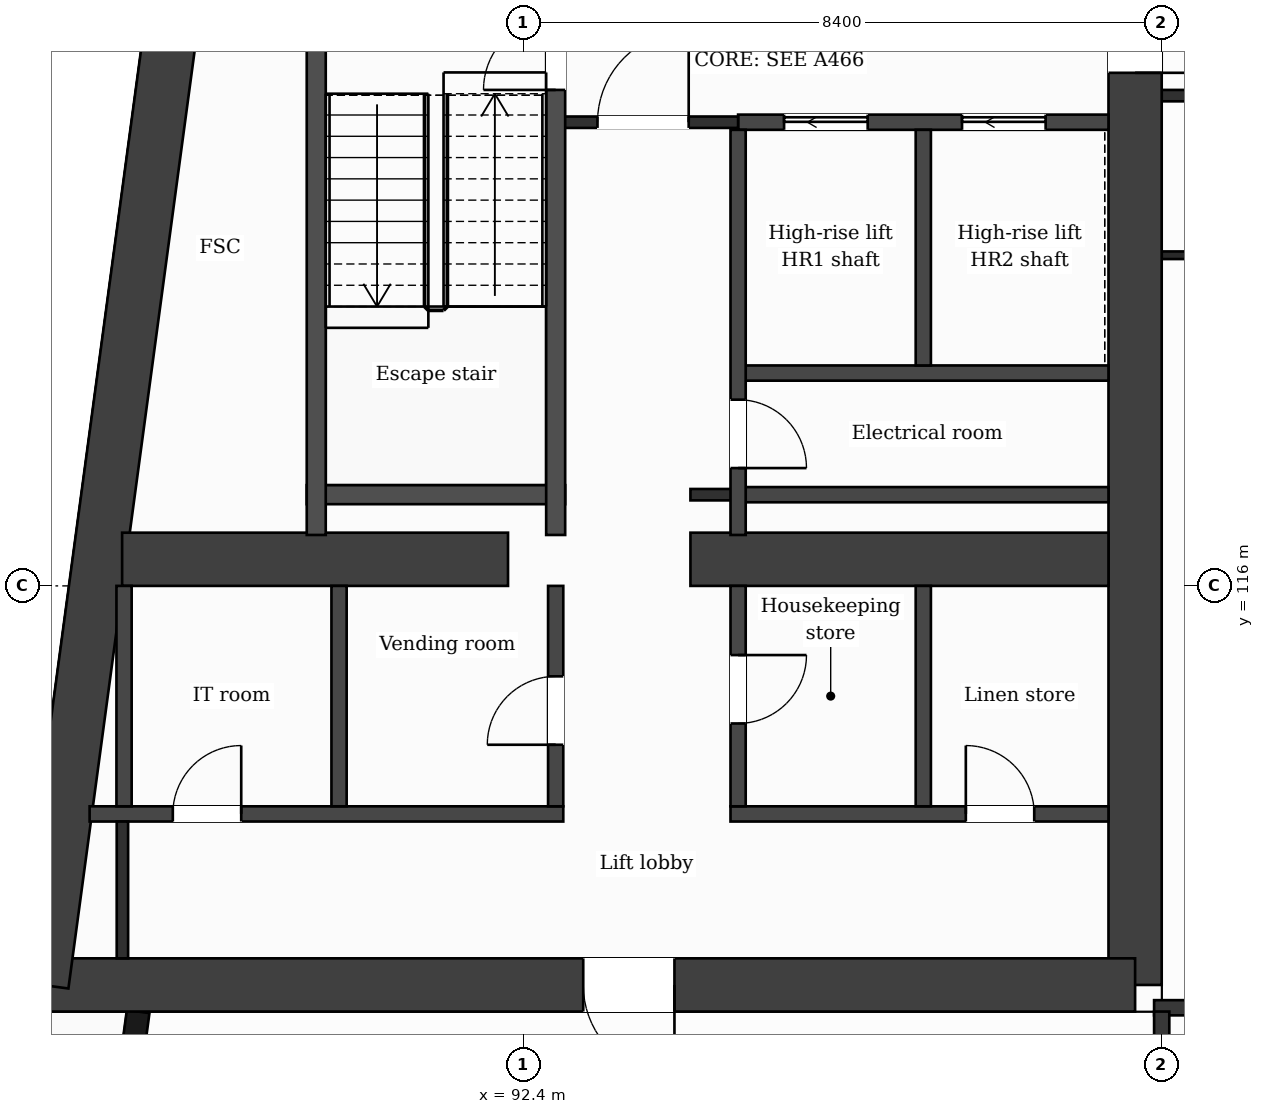
"""IFC4 building model, lengths in metres.
Left out: names, types, materials, properties, quantities, classifications, styles, units other than length and angle.
Written with IfcOpenShell. Run it as: python <this file> out.ifc"""

import sys

from ifc_helpers import new_model, si_unit, direction, frame, frame_2d, origin, place, context, subcontext, project, spatial, rectangle, extrude, element, fill, save


model = new_model("IFC4")
c1 = context("Model", 3, precision=1e-05, world=origin(), true_north=direction((0.0, 1.0)))
c2 = subcontext(c1, "Body", "Model", "MODEL_VIEW")
j1 = project(units=[si_unit("LENGTHUNIT", "METRE"), si_unit("PLANEANGLEUNIT", "RADIAN")], contexts=[c1])
p1 = place(None, origin())
s1 = spatial("IfcSite", under=j1, at=p1, CompositionType="ELEMENT")
p2 = place(p1, origin())
s2 = spatial("IfcBuilding", under=s1, at=p2, CompositionType="ELEMENT")
p3 = place(p2, frame((0.0, 0.0, 270.1)))
s3 = spatial("IfcBuildingStorey", under=s2, at=p3, CompositionType="ELEMENT", Elevation=270.1)
p4 = place(p3, frame((100.45, 132.05, 0.0), z_axis=(0.0, 0.0, 1.0), x_axis=(0.0, -1.0, 0.0)))
e1 = element("IfcWall", 1, at=p4, inside=s3, PredefinedType="SHEAR", context=c2, shape_type="SweptSolid", body=[
    extrude(rectangle(XDim=21.3, YDim=0.7, at=frame_2d((10.65, 0.0))), origin(), (0.0, 0.0, 1.0), 3.7),
])
p5 = place(p4, frame((7.9, 0.0, 0.0)))
e2 = element("IfcOpeningElement", 2, at=p5, cuts=e1, PredefinedType="OPENING", context=c2, shape_type="SweptSolid", body=[
    extrude(rectangle(XDim=1.4, YDim=2.1, at=frame_2d((0.7, 1.05))), frame((0.0, 0.36, 0.0), z_axis=(0.0, -1.0, 0.0), x_axis=(1.0, 0.0, 0.0)), (0.0, 0.0, 1.0), 0.72),
])
p6 = place(p3, frame((100.45, 110.75, 0.0), z_axis=(0.0, 0.0, 1.0), x_axis=(-1.0, 0.0, 0.0)))
e3 = element("IfcWall", 3, at=p6, inside=s3, PredefinedType="SHEAR", context=c2, shape_type="SweptSolid", body=[
    extrude(rectangle(XDim=14.38, YDim=0.7, at=frame_2d((7.19, 0.0))), origin(), (0.0, 0.0, 1.0), 3.7),
])
p7 = place(p6, frame((6.06, 0.0, 0.0)))
e4 = element("IfcOpeningElement", 4, at=p7, cuts=e3, PredefinedType="OPENING", context=c2, shape_type="SweptSolid", body=[
    extrude(rectangle(XDim=1.2, YDim=2.1, at=frame_2d((0.6, 1.05))), frame((0.0, 0.36, 0.0), z_axis=(0.0, -1.0, 0.0), x_axis=(1.0, 0.0, 0.0)), (0.0, 0.0, 1.0), 0.72),
])
p8 = place(p3, frame((86.07, 110.75, 0.0), z_axis=(0.0, 0.0, 1.0), x_axis=(0.133406218907, 0.991061441464, 0.0)))
e5 = element("IfcWall", 5, at=p8, inside=s3, PredefinedType="SHEAR", context=c2, shape_type="SweptSolid", body=[
    extrude(rectangle(XDim=21.492, YDim=0.7, at=frame_2d((10.746, 0.0))), origin(), (0.0, 0.0, 1.0), 3.7),
])
p9 = place(p3, frame((87.123, 116.35, 0.0), z_axis=(0.0, 0.0, 1.0), x_axis=(1.0, 0.0, 0.0)))
e6 = element("IfcWall", 6, at=p9, inside=s3, PredefinedType="SHEAR", context=c2, shape_type="SweptSolid", body=[
    extrude(rectangle(XDim=5.077, YDim=0.7, at=frame_2d((2.539, 0.0))), origin(), (0.0, 0.0, 1.0), 3.7),
])
p10 = place(p3, frame((94.6, 116.35, 0.0), z_axis=(0.0, 0.0, 1.0), x_axis=(1.0, 0.0, 0.0)))
e7 = element("IfcWall", 7, at=p10, inside=s3, PredefinedType="SHEAR", context=c2, shape_type="SweptSolid", body=[
    extrude(rectangle(XDim=5.5, YDim=0.7, at=frame_2d((2.75, 0.0))), origin(), (0.0, 0.0, 1.0), 3.7),
])
p11 = place(p3, frame((87.334, 110.4, 0.0), z_axis=(0.0, 0.0, 1.0), x_axis=(-0.13345962011, -0.991054251694, 0.0)))
e8 = element("IfcWall", 8, at=p11, inside=s3, PredefinedType="SOLIDWALL", context=c2, shape_type="SweptSolid", body=[
    extrude(rectangle(XDim=1.937, YDim=0.3, at=frame_2d((0.969, 0.0))), origin(), (0.0, 0.0, 1.0), 3.38),
])
p12 = place(p3, frame((100.7, 110.45, 0.0), z_axis=(0.0, 0.0, 1.0), x_axis=(1.0, 0.0, 0.0)))
e9 = element("IfcWall", 9, at=p12, inside=s3, PredefinedType="PARTITIONING", context=c2, shape_type="SweptSolid", body=[
    extrude(rectangle(XDim=25.4, YDim=0.2, at=frame_2d((12.7, 0.0))), origin(), (0.0, 0.0, 1.0), 3.38),
])
p13 = place(p3, frame((86.696, 113.0, 0.0), z_axis=(0.0, 0.0, 1.0), x_axis=(1.0, 0.0, 0.0)))
e10 = element("IfcWall", 10, at=p13, inside=s3, PredefinedType="PARTITIONING", context=c2, shape_type="SweptSolid", body=[
    extrude(rectangle(XDim=6.231, YDim=0.2, at=frame_2d((3.116, 0.0))), origin(), (0.0, 0.0, 1.0), 3.38),
])
p14 = place(p13, frame((1.094, 0.0, 0.0)))
e11 = element("IfcOpeningElement", 11, at=p14, cuts=e10, PredefinedType="OPENING", context=c2, shape_type="SweptSolid", body=[
    extrude(rectangle(XDim=0.9, YDim=2.1, at=frame_2d((0.45, 1.05))), frame((0.0, 0.11, 0.0), z_axis=(0.0, -1.0, 0.0), x_axis=(1.0, 0.0, 0.0)), (0.0, 0.0, 1.0), 0.22),
])
p15 = place(p3, frame((95.127, 113.0, 0.0), z_axis=(0.0, 0.0, 1.0), x_axis=(1.0, 0.0, 0.0)))
e12 = element("IfcWall", 12, at=p15, inside=s3, PredefinedType="PARTITIONING", context=c2, shape_type="SweptSolid", body=[
    extrude(rectangle(XDim=4.973, YDim=0.2, at=frame_2d((2.487, 0.0))), origin(), (0.0, 0.0, 1.0), 3.38),
])
p16 = place(p15, frame((3.096, 0.0, 0.0)))
e13 = element("IfcOpeningElement", 13, at=p16, cuts=e12, PredefinedType="OPENING", context=c2, shape_type="SweptSolid", body=[
    extrude(rectangle(XDim=0.9, YDim=2.1, at=frame_2d((0.45, 1.05))), frame((0.0, 0.11, 0.0), z_axis=(0.0, -1.0, 0.0), x_axis=(1.0, 0.0, 0.0)), (0.0, 0.0, 1.0), 0.22),
])
p17 = place(p3, frame((95.227, 117.2, 0.0), z_axis=(0.0, 0.0, 1.0), x_axis=(1.0, 0.0, 0.0)))
e14 = element("IfcWall", 14, at=p17, inside=s3, PredefinedType="PARTITIONING", context=c2, shape_type="SweptSolid", body=[
    extrude(rectangle(XDim=4.873, YDim=0.2, at=frame_2d((2.437, 0.0))), origin(), (0.0, 0.0, 1.0), 3.38),
])
p18 = place(p3, frame((94.6, 117.2, 0.0), z_axis=(0.0, 0.0, 1.0), x_axis=(1.0, 0.0, 0.0)))
e15 = element("IfcWall", 15, at=p18, inside=s3, PredefinedType="PARTITIONING", context=c2, shape_type="SweptSolid", body=[
    extrude(rectangle(XDim=0.627, YDim=0.15, at=frame_2d((0.313, 0.0))), origin(), (0.0, 0.0, 1.0), 3.38),
])
p19 = place(p3, frame((89.552, 117.2, 0.0), z_axis=(0.0, 0.0, 1.0), x_axis=(1.0, 0.0, 0.0)))
e16 = element("IfcWall", 16, at=p19, inside=s3, PredefinedType="PARTITIONING", context=c2, shape_type="SweptSolid", body=[
    extrude(rectangle(XDim=3.4, YDim=0.25, at=frame_2d((1.7, 0.0))), origin(), (0.0, 0.0, 1.0), 3.38),
])
p20 = place(p3, frame((95.227, 118.8, 0.0), z_axis=(0.0, 0.0, 1.0), x_axis=(1.0, 0.0, 0.0)))
e17 = element("IfcWall", 17, at=p20, inside=s3, PredefinedType="PARTITIONING", context=c2, shape_type="SweptSolid", body=[
    extrude(rectangle(XDim=4.873, YDim=0.2, at=frame_2d((2.437, 0.0))), origin(), (0.0, 0.0, 1.0), 3.38),
])
p21 = place(p3, frame((100.8, 120.35, 0.0), z_axis=(0.0, 0.0, 1.0), x_axis=(1.0, 0.0, 0.0)))
e18 = element("IfcWall", 18, at=p21, inside=s3, PredefinedType="PARTITIONING", context=c2, shape_type="SweptSolid", body=[
    extrude(rectangle(XDim=2.75, YDim=0.1, at=frame_2d((1.375, 0.0))), origin(), (0.0, 0.0, 1.0), 3.38),
])
p22 = place(p21, frame((1.07, 0.0, 0.0)))
e19 = element("IfcOpeningElement", 19, at=p22, cuts=e18, PredefinedType="OPENING", context=c2, shape_type="SweptSolid", body=[
    extrude(rectangle(XDim=0.8, YDim=2.1, at=frame_2d((0.4, 1.05))), frame((0.0, 0.06, 0.0), z_axis=(0.0, -1.0, 0.0), x_axis=(1.0, 0.0, 0.0)), (0.0, 0.0, 1.0), 0.12),
])
p23 = place(p3, frame((95.227, 122.1, 0.0), z_axis=(0.0, 0.0, 1.0), x_axis=(1.0, 0.0, 0.0)))
e20 = element("IfcWall", 20, at=p23, inside=s3, PredefinedType="PARTITIONING", context=c2, shape_type="SweptSolid", body=[
    extrude(rectangle(XDim=4.873, YDim=0.2, at=frame_2d((2.437, 0.0))), origin(), (0.0, 0.0, 1.0), 3.38),
])
p24 = place(p23, frame((0.605, 0.0, 0.0)))
e21 = element("IfcOpeningElement", 21, at=p24, cuts=e20, PredefinedType="OPENING", context=c2, shape_type="SweptSolid", body=[
    extrude(rectangle(XDim=1.1, YDim=2.1, at=frame_2d((0.55, 1.05))), frame((0.0, 0.11, 0.0), z_axis=(0.0, -1.0, 0.0), x_axis=(1.0, 0.0, 0.0)), (0.0, 0.0, 1.0), 0.22),
])
p25 = place(p23, frame((2.946, 0.0, 0.0)))
e22 = element("IfcOpeningElement", 22, at=p25, cuts=e20, PredefinedType="OPENING", context=c2, shape_type="SweptSolid", body=[
    extrude(rectangle(XDim=1.1, YDim=2.1, at=frame_2d((0.55, 1.05))), frame((0.0, 0.11, 0.0), z_axis=(0.0, -1.0, 0.0), x_axis=(1.0, 0.0, 0.0)), (0.0, 0.0, 1.0), 0.22),
])
p26 = place(p3, frame((92.827, 122.1, 0.0), z_axis=(0.0, 0.0, 1.0), x_axis=(1.0, 0.0, 0.0)))
e23 = element("IfcWall", 23, at=p26, inside=s3, PredefinedType="PARTITIONING", context=c2, shape_type="SweptSolid", body=[
    extrude(rectangle(XDim=2.4, YDim=0.15, at=frame_2d((1.2, 0.0))), origin(), (0.0, 0.0, 1.0), 3.38),
])
p27 = place(p26, frame((0.55, 0.0, 0.0)))
e24 = element("IfcOpeningElement", 24, at=p27, cuts=e23, PredefinedType="OPENING", context=c2, shape_type="SweptSolid", body=[
    extrude(rectangle(XDim=1.2, YDim=2.1, at=frame_2d((0.6, 1.05))), frame((0.0, 0.085, 0.0), z_axis=(0.0, -1.0, 0.0), x_axis=(1.0, 0.0, 0.0)), (0.0, 0.0, 1.0), 0.17),
])
p28 = place(p3, frame((100.8, 122.45, 0.0), z_axis=(0.0, 0.0, 1.0), x_axis=(1.0, 0.0, 0.0)))
e25 = element("IfcWall", 25, at=p28, inside=s3, PredefinedType="PARTITIONING", context=c2, shape_type="SweptSolid", body=[
    extrude(rectangle(XDim=25.2, YDim=0.15, at=frame_2d((12.6, 0.0))), origin(), (0.0, 0.0, 1.0), 3.38),
])
p29 = place(p28, frame((5.55, 0.0, 0.0)))
e26 = element("IfcOpeningElement", 26, at=p29, cuts=e25, PredefinedType="OPENING", context=c2, shape_type="SweptSolid", body=[
    extrude(rectangle(XDim=1.0, YDim=2.1, at=frame_2d((0.5, 1.05))), frame((0.0, 0.085, 0.0), z_axis=(0.0, -1.0, 0.0), x_axis=(1.0, 0.0, 0.0)), (0.0, 0.0, 1.0), 0.17),
])
p30 = place(p28, frame((8.862, 0.0, 0.0)))
e27 = element("IfcOpeningElement", 27, at=p30, cuts=e25, PredefinedType="OPENING", context=c2, shape_type="SweptSolid", body=[
    extrude(rectangle(XDim=0.95, YDim=2.1, at=frame_2d((0.475, 1.05))), frame((0.0, 0.085, 0.0), z_axis=(0.0, -1.0, 0.0), x_axis=(1.0, 0.0, 0.0)), (0.0, 0.0, 1.0), 0.17),
])
p31 = place(p28, frame((15.2, 0.0, 0.0)))
e28 = element("IfcOpeningElement", 28, at=p31, cuts=e25, PredefinedType="OPENING", context=c2, shape_type="SweptSolid", body=[
    extrude(rectangle(XDim=0.95, YDim=2.1, at=frame_2d((0.475, 1.05))), frame((0.0, 0.085, 0.0), z_axis=(0.0, -1.0, 0.0), x_axis=(1.0, 0.0, 0.0)), (0.0, 0.0, 1.0), 0.17),
])
p32 = place(p28, frame((17.325, 0.0, 0.0)))
e29 = element("IfcOpeningElement", 29, at=p32, cuts=e25, PredefinedType="OPENING", context=c2, shape_type="SweptSolid", body=[
    extrude(rectangle(XDim=1.0, YDim=2.1, at=frame_2d((0.5, 1.05))), frame((0.0, 0.085, 0.0), z_axis=(0.0, -1.0, 0.0), x_axis=(1.0, 0.0, 0.0)), (0.0, 0.0, 1.0), 0.17),
])
p33 = place(p28, frame((23.862, 0.0, 0.0)))
e30 = element("IfcOpeningElement", 30, at=p33, cuts=e25, PredefinedType="OPENING", context=c2, shape_type="SweptSolid", body=[
    extrude(rectangle(XDim=0.95, YDim=2.1, at=frame_2d((0.475, 1.05))), frame((0.0, 0.085, 0.0), z_axis=(0.0, -1.0, 0.0), x_axis=(1.0, 0.0, 0.0)), (0.0, 0.0, 1.0), 0.17),
])
p34 = place(p3, frame((87.148, 113.1, 0.0), z_axis=(0.0, 0.0, 1.0), x_axis=(0.0, 1.0, 0.0)))
e31 = element("IfcWall", 31, at=p34, inside=s3, PredefinedType="PARTITIONING", context=c2, shape_type="SweptSolid", body=[
    extrude(rectangle(XDim=2.9, YDim=0.2, at=frame_2d((1.45, 0.0))), origin(), (0.0, 0.0, 1.0), 3.38),
])
p35 = place(p3, frame((87.127, 111.1, 0.0), z_axis=(0.0, 0.0, 1.0), x_axis=(0.0, 1.0, 0.0)))
e32 = element("IfcWall", 32, at=p35, inside=s3, PredefinedType="PARTITIONING", context=c2, shape_type="SweptSolid", body=[
    extrude(rectangle(XDim=1.8, YDim=0.15, at=frame_2d((0.9, 0.0))), origin(), (0.0, 0.0, 1.0), 3.38),
])
p36 = place(p3, frame((89.677, 116.67, 0.0), z_axis=(0.0, 0.0, 1.0), x_axis=(0.0, 1.0, 0.0)))
e33 = element("IfcWall", 33, at=p36, inside=s3, PredefinedType="PARTITIONING", context=c2, shape_type="SweptSolid", body=[
    extrude(rectangle(XDim=7.155, YDim=0.25, at=frame_2d((3.578, 0.0))), origin(), (0.0, 0.0, 1.0), 3.38),
])
p37 = place(p3, frame((89.977, 113.1, 0.0), z_axis=(0.0, 0.0, 1.0), x_axis=(0.0, 1.0, 0.0)))
e34 = element("IfcWall", 34, at=p37, inside=s3, PredefinedType="PARTITIONING", context=c2, shape_type="SweptSolid", body=[
    extrude(rectangle(XDim=2.9, YDim=0.2, at=frame_2d((1.45, 0.0))), origin(), (0.0, 0.0, 1.0), 3.38),
])
p38 = place(p3, frame((92.827, 113.1, 0.0), z_axis=(0.0, 0.0, 1.0), x_axis=(0.0, 1.0, 0.0)))
e35 = element("IfcWall", 35, at=p38, inside=s3, PredefinedType="PARTITIONING", context=c2, shape_type="SweptSolid", body=[
    extrude(rectangle(XDim=2.9, YDim=0.2, at=frame_2d((1.45, 0.0))), origin(), (0.0, 0.0, 1.0), 3.38),
])
p39 = place(p38, frame((0.81, 0.0, 0.0)))
e36 = element("IfcOpeningElement", 36, at=p39, cuts=e35, PredefinedType="OPENING", context=c2, shape_type="SweptSolid", body=[
    extrude(rectangle(XDim=0.9, YDim=2.1, at=frame_2d((0.45, 1.05))), frame((0.0, 0.11, 0.0), z_axis=(0.0, -1.0, 0.0), x_axis=(1.0, 0.0, 0.0)), (0.0, 0.0, 1.0), 0.22),
])
p40 = place(p3, frame((92.827, 116.67, 0.0), z_axis=(0.0, 0.0, 1.0), x_axis=(0.0, 1.0, 0.0)))
e37 = element("IfcWall", 37, at=p40, inside=s3, PredefinedType="PARTITIONING", context=c2, shape_type="SweptSolid", body=[
    extrude(rectangle(XDim=7.155, YDim=0.25, at=frame_2d((3.578, 0.0))), origin(), (0.0, 0.0, 1.0), 3.38),
])
p41 = place(p40, frame((5.855, 0.0, 0.0)))
e38 = element("IfcOpeningElement", 38, at=p41, cuts=e37, PredefinedType="OPENING", context=c2, shape_type="SweptSolid", body=[
    extrude(rectangle(XDim=0.95, YDim=2.1, at=frame_2d((0.475, 1.05))), frame((0.0, 0.135, 0.0), z_axis=(0.0, -1.0, 0.0), x_axis=(1.0, 0.0, 0.0)), (0.0, 0.0, 1.0), 0.27),
])
p42 = place(p3, frame((95.227, 113.1, 0.0), z_axis=(0.0, 0.0, 1.0), x_axis=(0.0, 1.0, 0.0)))
e39 = element("IfcWall", 39, at=p42, inside=s3, PredefinedType="PARTITIONING", context=c2, shape_type="SweptSolid", body=[
    extrude(rectangle(XDim=2.9, YDim=0.2, at=frame_2d((1.45, 0.0))), origin(), (0.0, 0.0, 1.0), 3.38),
])
p43 = place(p42, frame((1.09, 0.0, 0.0)))
e40 = element("IfcOpeningElement", 40, at=p43, cuts=e39, PredefinedType="OPENING", context=c2, shape_type="SweptSolid", body=[
    extrude(rectangle(XDim=0.9, YDim=2.1, at=frame_2d((0.45, 1.05))), frame((0.0, 0.11, 0.0), z_axis=(0.0, -1.0, 0.0), x_axis=(1.0, 0.0, 0.0)), (0.0, 0.0, 1.0), 0.22),
])
p44 = place(p3, frame((95.227, 116.67, 0.0), z_axis=(0.0, 0.0, 1.0), x_axis=(0.0, 1.0, 0.0)))
e41 = element("IfcWall", 41, at=p44, inside=s3, PredefinedType="PARTITIONING", context=c2, shape_type="SweptSolid", body=[
    extrude(rectangle(XDim=5.33, YDim=0.2, at=frame_2d((2.665, 0.0))), origin(), (0.0, 0.0, 1.0), 3.38),
])
p45 = place(p44, frame((0.88, 0.0, 0.0)))
e42 = element("IfcOpeningElement", 42, at=p45, cuts=e41, PredefinedType="OPENING", context=c2, shape_type="SweptSolid", body=[
    extrude(rectangle(XDim=0.9, YDim=2.1, at=frame_2d((0.45, 1.05))), frame((0.0, 0.11, 0.0), z_axis=(0.0, -1.0, 0.0), x_axis=(1.0, 0.0, 0.0)), (0.0, 0.0, 1.0), 0.22),
])
p46 = place(p3, frame((97.664, 113.1, 0.0), z_axis=(0.0, 0.0, 1.0), x_axis=(0.0, 1.0, 0.0)))
e43 = element("IfcWall", 43, at=p46, inside=s3, PredefinedType="PARTITIONING", context=c2, shape_type="SweptSolid", body=[
    extrude(rectangle(XDim=2.9, YDim=0.2, at=frame_2d((1.45, 0.0))), origin(), (0.0, 0.0, 1.0), 3.38),
])
p47 = place(p3, frame((97.664, 118.9, 0.0), z_axis=(0.0, 0.0, 1.0), x_axis=(0.0, 1.0, 0.0)))
e44 = element("IfcWall", 44, at=p47, inside=s3, PredefinedType="PARTITIONING", context=c2, shape_type="SweptSolid", body=[
    extrude(rectangle(XDim=3.1, YDim=0.2, at=frame_2d((1.55, 0.0))), origin(), (0.0, 0.0, 1.0), 3.38),
])
p48 = place(p3, frame((100.8, 108.79, 0.0), z_axis=(0.0, 0.0, 1.0), x_axis=(0.0, 1.0, 0.0)))
e45 = element("IfcWall", 45, at=p48, inside=s3, PredefinedType="PARTITIONING", context=c2, shape_type="SweptSolid", body=[
    extrude(rectangle(XDim=1.61, YDim=0.2, at=frame_2d((0.805, 0.0))), origin(), (0.0, 0.0, 1.0), 3.38),
])
p49 = place(p27, origin())
e46 = element("IfcDoor", 46, at=p49, inside=s3, OperationType="SINGLE_SWING_RIGHT", PredefinedType="DOOR", context=c2, shape_type="SweptSolid", body=[
    extrude(rectangle(XDim=1.2, YDim=2.1, at=frame_2d((0.6, 1.05))), frame((0.0, 0.025, 0.0), z_axis=(0.0, -1.0, 0.0), x_axis=(1.0, 0.0, 0.0)), (0.0, 0.0, 1.0), 0.05),
])
fill(e24, e46)
p50 = place(p24, origin())
e47 = element("IfcDoor", 47, at=p50, inside=s3, OperationType="SLIDING_TO_LEFT", PredefinedType="DOOR", context=c2, shape_type="SweptSolid", body=[
    extrude(rectangle(XDim=1.1, YDim=2.1, at=frame_2d((0.55, 1.05))), frame((0.0, 0.025, 0.0), z_axis=(0.0, -1.0, 0.0), x_axis=(1.0, 0.0, 0.0)), (0.0, 0.0, 1.0), 0.05),
])
fill(e21, e47)
p51 = place(p25, origin())
e48 = element("IfcDoor", 48, at=p51, inside=s3, OperationType="SLIDING_TO_LEFT", PredefinedType="DOOR", context=c2, shape_type="SweptSolid", body=[
    extrude(rectangle(XDim=1.1, YDim=2.1, at=frame_2d((0.55, 1.05))), frame((0.0, 0.025, 0.0), z_axis=(0.0, -1.0, 0.0), x_axis=(1.0, 0.0, 0.0)), (0.0, 0.0, 1.0), 0.05),
])
fill(e22, e48)
p52 = place(p41, origin())
e49 = element("IfcDoor", 49, at=p52, inside=s3, OperationType="SINGLE_SWING_LEFT", PredefinedType="DOOR", context=c2, shape_type="SweptSolid", body=[
    extrude(rectangle(XDim=0.95, YDim=2.1, at=frame_2d((0.475, 1.05))), frame((0.0, 0.025, 0.0), z_axis=(0.0, -1.0, 0.0), x_axis=(1.0, 0.0, 0.0)), (0.0, 0.0, 1.0), 0.05),
])
fill(e38, e49)
p53 = place(p45, origin())
e50 = element("IfcDoor", 50, at=p53, inside=s3, OperationType="SINGLE_SWING_LEFT", PredefinedType="DOOR", context=c2, shape_type="SweptSolid", body=[
    extrude(rectangle(XDim=0.9, YDim=2.1, at=frame_2d((0.45, 1.05))), frame((0.0, 0.025, 0.0), z_axis=(0.0, -1.0, 0.0), x_axis=(1.0, 0.0, 0.0)), (0.0, 0.0, 1.0), 0.05),
])
fill(e42, e50)
p54 = place(p14, origin())
e51 = element("IfcDoor", 51, at=p54, inside=s3, OperationType="SINGLE_SWING_RIGHT", PredefinedType="DOOR", context=c2, shape_type="SweptSolid", body=[
    extrude(rectangle(XDim=0.9, YDim=2.1, at=frame_2d((0.45, 1.05))), frame((0.0, 0.025, 0.0), z_axis=(0.0, -1.0, 0.0), x_axis=(1.0, 0.0, 0.0)), (0.0, 0.0, 1.0), 0.05),
])
fill(e11, e51)
p55 = place(p39, origin())
e52 = element("IfcDoor", 52, at=p55, inside=s3, OperationType="SINGLE_SWING_LEFT", PredefinedType="DOOR", context=c2, shape_type="SweptSolid", body=[
    extrude(rectangle(XDim=0.9, YDim=2.1, at=frame_2d((0.45, 1.05))), frame((0.0, 0.025, 0.0), z_axis=(0.0, -1.0, 0.0), x_axis=(1.0, 0.0, 0.0)), (0.0, 0.0, 1.0), 0.05),
])
fill(e36, e52)
p56 = place(p43, origin())
e53 = element("IfcDoor", 53, at=p56, inside=s3, OperationType="SINGLE_SWING_RIGHT", PredefinedType="DOOR", context=c2, shape_type="SweptSolid", body=[
    extrude(rectangle(XDim=0.9, YDim=2.1, at=frame_2d((0.45, 1.05))), frame((0.0, 0.025, 0.0), z_axis=(0.0, -1.0, 0.0), x_axis=(1.0, 0.0, 0.0)), (0.0, 0.0, 1.0), 0.05),
])
fill(e40, e53)
p57 = place(p16, origin())
e54 = element("IfcDoor", 54, at=p57, inside=s3, OperationType="SINGLE_SWING_LEFT", PredefinedType="DOOR", context=c2, shape_type="SweptSolid", body=[
    extrude(rectangle(XDim=0.9, YDim=2.1, at=frame_2d((0.45, 1.05))), frame((0.0, 0.025, 0.0), z_axis=(0.0, -1.0, 0.0), x_axis=(1.0, 0.0, 0.0)), (0.0, 0.0, 1.0), 0.05),
])
fill(e13, e54)
p58 = place(p7, origin())
e55 = element("IfcDoor", 55, at=p58, inside=s3, OperationType="SINGLE_SWING_LEFT", PredefinedType="DOOR", context=c2, shape_type="SweptSolid", body=[
    extrude(rectangle(XDim=1.2, YDim=2.1, at=frame_2d((0.6, 1.05))), frame((0.0, 0.025, 0.0), z_axis=(0.0, -1.0, 0.0), x_axis=(1.0, 0.0, 0.0)), (0.0, 0.0, 1.0), 0.05),
])
fill(e4, e55)
p59 = place(p5, origin())
e56 = element("IfcDoor", 56, at=p59, inside=s3, OperationType="SINGLE_SWING_RIGHT", PredefinedType="DOOR", context=c2, shape_type="SweptSolid", body=[
    extrude(rectangle(XDim=1.4, YDim=2.1, at=frame_2d((0.7, 1.05))), frame((0.0, 0.025, 0.0), z_axis=(0.0, -1.0, 0.0), x_axis=(1.0, 0.0, 0.0)), (0.0, 0.0, 1.0), 0.05),
])
fill(e2, e56)
save(model, sys.argv[1])
